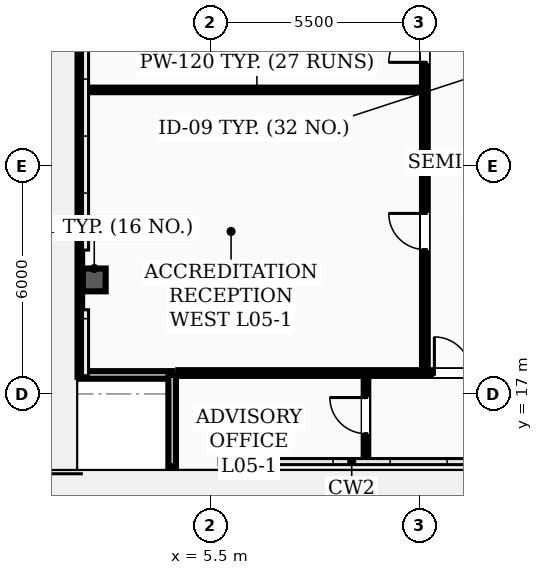
"""IFC4 building model, lengths in metres.
Left out: names, types, materials, properties, quantities, classifications, styles, units other than length and angle.
Written with IfcOpenShell. Run it as: python <this file> out.ifc"""

import sys

from ifc_helpers import new_model, si_unit, direction, frame, frame_2d, origin, origin_2d, place, context, subcontext, project, spatial, rectangle, hollow_rectangle, extrude, element, fill, save


model = new_model("IFC4")
c1 = context("Model", 3, precision=1e-05, world=origin(), true_north=direction((0.0, 1.0)))
c2 = subcontext(c1, "Body", "Model", "MODEL_VIEW")
j1 = project(units=[si_unit("LENGTHUNIT", "METRE"), si_unit("PLANEANGLEUNIT", "RADIAN")], contexts=[c1])
p1 = place(None, origin())
s1 = spatial("IfcSite", under=j1, at=p1, CompositionType="ELEMENT")
p2 = place(p1, origin())
s2 = spatial("IfcBuilding", under=s1, at=p2, CompositionType="ELEMENT")
p3 = place(p2, frame((0.0, 0.0, 22.0)))
s3 = spatial("IfcBuildingStorey", under=s2, at=p3, CompositionType="ELEMENT", Elevation=22.0)
p4 = place(p3, frame((2.45, 20.0, 0.0), z_axis=(0.0, 0.0, 1.0), x_axis=(1.0, 0.0, 0.0)))
e1 = element("IfcColumn", 1, at=p4, inside=s3, PredefinedType="COLUMN", context=c2, shape_type="SweptSolid", body=[
    extrude(hollow_rectangle(XDim=0.6, YDim=0.6, WallThickness=0.026, InnerFilletRadius=0.013, OuterFilletRadius=0.039, at=origin_2d()), origin(), (0.0, 0.0, 1.0), 4.5),
])
for number, where, z_axis, x_axis in (
    (2, (2.1, 17.5, 0.0), (0.0, 0.0, 1.0), (1.0, 0.0, 0.0)),
    (3, (4.5, 17.5, 0.0), (0.0, 0.0, 1.0), (0.0, -1.0, 0.0)),
):
    element("IfcWall", number, at=place(p3, frame(where, z_axis=z_axis, x_axis=x_axis)), inside=s3, PredefinedType="PARAPET", context=c2, shape_type="SweptSolid", body=[
        extrude(rectangle(XDim=2.4, YDim=0.2, at=frame_2d((1.2, 0.0))), origin(), (0.0, 0.0, 1.0), 1.2),
    ])
p5 = place(p3, frame((2.07, 17.45, 0.0), z_axis=(0.0, 0.0, 1.0), x_axis=(0.0, 1.0, 0.0)))
e4 = element("IfcWall", 4, at=p5, inside=s3, PredefinedType="PARAPET", context=c2, shape_type="SweptSolid", body=[
    extrude(rectangle(XDim=27.1, YDim=0.12, at=frame_2d((13.55, 0.0))), origin(), (0.0, 0.0, 1.0), 1.2),
])
p6 = place(p3, frame((4.66, 17.55, 0.0), z_axis=(0.0, 0.0, 1.0), x_axis=(1.0, 0.0, 0.0)))
e5 = element("IfcWall", 5, at=p6, inside=s3, PredefinedType="PARTITIONING", context=c2, shape_type="SweptSolid", body=[
    extrude(rectangle(XDim=44.68, YDim=0.15, at=frame_2d((22.34, 0.0))), origin(), (0.0, 0.0, 1.0), 3.7),
])
p7 = place(p6, frame((6.74, 0.0, 0.0)))
e6 = element("IfcOpeningElement", 6, at=p7, cuts=e5, PredefinedType="OPENING", context=c2, shape_type="SweptSolid", body=[
    extrude(rectangle(XDim=0.95, YDim=2.08, at=frame_2d((0.475, 1.04))), frame((0.0, 0.085, 0.0), z_axis=(0.0, -1.0, 0.0), x_axis=(1.0, 0.0, 0.0)), (0.0, 0.0, 1.0), 0.17),
])
p8 = place(p6, frame((13.865, 0.0, 0.0)))
e7 = element("IfcOpeningElement", 7, at=p8, cuts=e5, PredefinedType="OPENING", context=c2, shape_type="SweptSolid", body=[
    extrude(rectangle(XDim=0.95, YDim=2.08, at=frame_2d((0.475, 1.04))), frame((0.0, 0.085, 0.0), z_axis=(0.0, -1.0, 0.0), x_axis=(1.0, 0.0, 0.0)), (0.0, 0.0, 1.0), 0.17),
])
p9 = place(p6, frame((28.765, 0.0, 0.0)))
e8 = element("IfcOpeningElement", 8, at=p9, cuts=e5, PredefinedType="OPENING", context=c2, shape_type="SweptSolid", body=[
    extrude(rectangle(XDim=0.95, YDim=2.08, at=frame_2d((0.475, 1.04))), frame((0.0, 0.085, 0.0), z_axis=(0.0, -1.0, 0.0), x_axis=(1.0, 0.0, 0.0)), (0.0, 0.0, 1.0), 0.17),
])
p10 = place(p6, frame((34.465, 0.0, 0.0)))
e9 = element("IfcOpeningElement", 9, at=p10, cuts=e5, PredefinedType="OPENING", context=c2, shape_type="SweptSolid", body=[
    extrude(rectangle(XDim=0.95, YDim=2.08, at=frame_2d((0.475, 1.04))), frame((0.0, 0.085, 0.0), z_axis=(0.0, -1.0, 0.0), x_axis=(1.0, 0.0, 0.0)), (0.0, 0.0, 1.0), 0.17),
])
p11 = place(p6, frame((39.24, 0.0, 0.0)))
e10 = element("IfcOpeningElement", 10, at=p11, cuts=e5, PredefinedType="OPENING", context=c2, shape_type="SweptSolid", body=[
    extrude(rectangle(XDim=0.95, YDim=2.08, at=frame_2d((0.475, 1.04))), frame((0.0, 0.085, 0.0), z_axis=(0.0, -1.0, 0.0), x_axis=(1.0, 0.0, 0.0)), (0.0, 0.0, 1.0), 0.17),
])
p12 = place(p3, frame((2.31, 25.0, 0.0), z_axis=(0.0, 0.0, 1.0), x_axis=(1.0, 0.0, 0.0)))
e11 = element("IfcWall", 11, at=p12, inside=s3, PredefinedType="PARTITIONING", context=c2, shape_type="SweptSolid", body=[
    extrude(rectangle(XDim=8.84, YDim=0.12, at=frame_2d((4.42, 0.0))), origin(), (0.0, 0.0, 1.0), 3.812),
])
p13 = place(p3, frame((11.15, 17.635, 0.0), z_axis=(0.0, 0.0, 1.0), x_axis=(0.0, 1.0, 0.0)))
e12 = element("IfcWall", 12, at=p13, inside=s3, PredefinedType="PARTITIONING", context=c2, shape_type="SweptSolid", body=[
    extrude(rectangle(XDim=22.53, YDim=0.15, at=frame_2d((11.265, 0.0))), origin(), (0.0, 0.0, 1.0), 3.6),
])
p14 = place(p13, frame((3.165, 0.0, 0.0)))
e13 = element("IfcOpeningElement", 13, at=p14, cuts=e12, PredefinedType="OPENING", context=c2, shape_type="SweptSolid", body=[
    extrude(rectangle(XDim=0.95, YDim=2.08, at=frame_2d((0.475, 1.04))), frame((0.0, 0.085, 0.0), z_axis=(0.0, -1.0, 0.0), x_axis=(1.0, 0.0, 0.0)), (0.0, 0.0, 1.0), 0.17),
])
p15 = place(p13, frame((8.09, 0.0, 0.0)))
e14 = element("IfcOpeningElement", 14, at=p15, cuts=e12, PredefinedType="OPENING", context=c2, shape_type="SweptSolid", body=[
    extrude(rectangle(XDim=0.95, YDim=2.08, at=frame_2d((0.475, 1.04))), frame((0.0, 0.085, 0.0), z_axis=(0.0, -1.0, 0.0), x_axis=(1.0, 0.0, 0.0)), (0.0, 0.0, 1.0), 0.17),
])
p16 = place(p13, frame((15.39, 0.0, 0.0)))
e15 = element("IfcOpeningElement", 15, at=p16, cuts=e12, PredefinedType="OPENING", context=c2, shape_type="SweptSolid", body=[
    extrude(rectangle(XDim=0.95, YDim=2.08, at=frame_2d((0.475, 1.04))), frame((0.0, 0.085, 0.0), z_axis=(0.0, -1.0, 0.0), x_axis=(1.0, 0.0, 0.0)), (0.0, 0.0, 1.0), 0.17),
])
p17 = place(p13, frame((20.015, 0.0, 0.0)))
e16 = element("IfcOpeningElement", 16, at=p17, cuts=e12, PredefinedType="OPENING", context=c2, shape_type="SweptSolid", body=[
    extrude(rectangle(XDim=0.95, YDim=2.08, at=frame_2d((0.475, 1.04))), frame((0.0, 0.085, 0.0), z_axis=(0.0, -1.0, 0.0), x_axis=(1.0, 0.0, 0.0)), (0.0, 0.0, 1.0), 0.17),
])
p18 = place(p3, frame((9.6, 15.31, 0.0), z_axis=(0.0, 0.0, 1.0), x_axis=(0.0, 1.0, 0.0)))
e17 = element("IfcWall", 17, at=p18, inside=s3, PredefinedType="PARTITIONING", context=c2, shape_type="SweptSolid", body=[
    extrude(rectangle(XDim=2.155, YDim=0.12, at=frame_2d((1.078, 0.0))), origin(), (0.0, 0.0, 1.0), 4.32),
])
p19 = place(p18, frame((0.645, 0.0, 0.0)))
e18 = element("IfcOpeningElement", 18, at=p19, cuts=e17, PredefinedType="OPENING", context=c2, shape_type="SweptSolid", body=[
    extrude(rectangle(XDim=0.95, YDim=2.08, at=frame_2d((0.475, 1.04))), frame((0.0, 0.07, 0.0), z_axis=(0.0, -1.0, 0.0), x_axis=(1.0, 0.0, 0.0)), (0.0, 0.0, 1.0), 0.14),
])
p20 = place(p19, origin())
e19 = element("IfcDoor", 19, at=p20, inside=s3, OperationType="SINGLE_SWING_RIGHT", PredefinedType="DOOR", context=c2, shape_type="SweptSolid", body=[
    extrude(rectangle(XDim=0.95, YDim=2.08, at=frame_2d((0.475, 1.04))), frame((0.0, 0.025, 0.0), z_axis=(0.0, -1.0, 0.0), x_axis=(1.0, 0.0, 0.0)), (0.0, 0.0, 1.0), 0.05),
])
fill(e18, e19)
p21 = place(p7, origin())
e20 = element("IfcDoor", 20, at=p21, inside=s3, OperationType="SINGLE_SWING_LEFT", PredefinedType="DOOR", context=c2, shape_type="SweptSolid", body=[
    extrude(rectangle(XDim=0.95, YDim=2.08, at=frame_2d((0.475, 1.04))), frame((0.0, 0.025, 0.0), z_axis=(0.0, -1.0, 0.0), x_axis=(1.0, 0.0, 0.0)), (0.0, 0.0, 1.0), 0.05),
])
fill(e6, e20)
p22 = place(p14, origin())
e21 = element("IfcDoor", 21, at=p22, inside=s3, OperationType="SINGLE_SWING_RIGHT", PredefinedType="DOOR", context=c2, shape_type="SweptSolid", body=[
    extrude(rectangle(XDim=0.95, YDim=2.08, at=frame_2d((0.475, 1.04))), frame((0.0, 0.025, 0.0), z_axis=(0.0, -1.0, 0.0), x_axis=(1.0, 0.0, 0.0)), (0.0, 0.0, 1.0), 0.05),
])
fill(e13, e21)
p23 = place(p15, origin())
e22 = element("IfcDoor", 22, at=p23, inside=s3, OperationType="SINGLE_SWING_LEFT", PredefinedType="DOOR", context=c2, shape_type="SweptSolid", body=[
    extrude(rectangle(XDim=0.95, YDim=2.08, at=frame_2d((0.475, 1.04))), frame((0.0, 0.025, 0.0), z_axis=(0.0, -1.0, 0.0), x_axis=(1.0, 0.0, 0.0)), (0.0, 0.0, 1.0), 0.05),
])
fill(e14, e22)
save(model, sys.argv[1])
